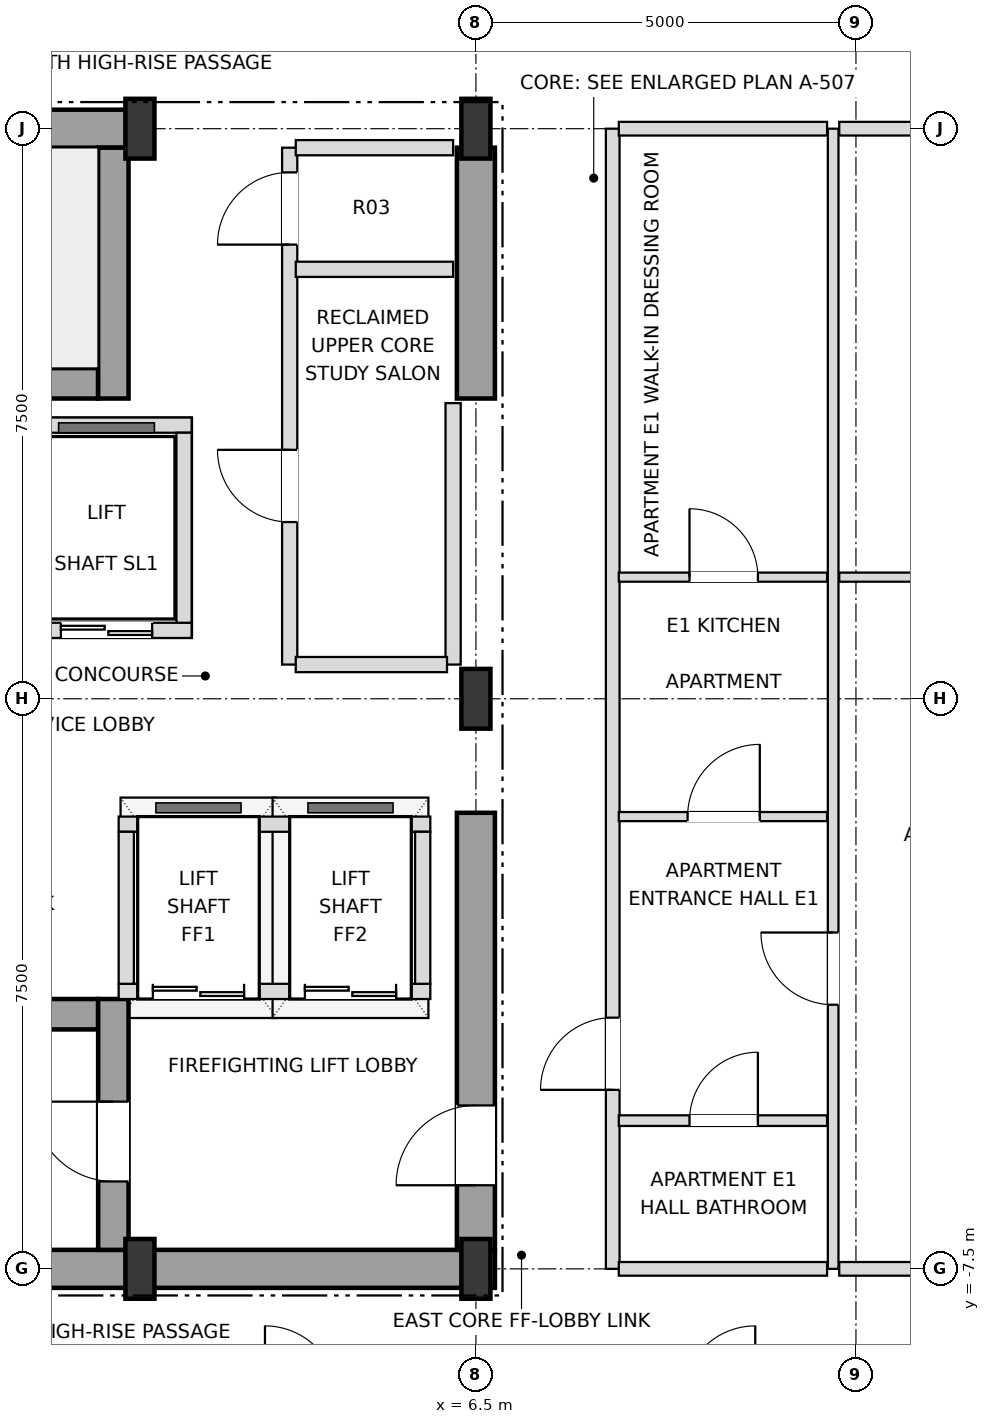
"""IFC4 building model, lengths in metres.
Left out: names, types, materials, properties, quantities, classifications, styles, units other than length and angle.
Written with IfcOpenShell. Run it as: python <this file> out.ifc"""

import sys

from ifc_helpers import new_model, si_unit, direction, frame, frame_2d, origin, origin_2d, place, context, subcontext, project, spatial, rectangle, i_section, extrude, element, fill, save


model = new_model("IFC4")
c1 = context("Model", 3, precision=1e-05, world=origin(), true_north=direction((0.0, 1.0)))
c2 = subcontext(c1, "Body", "Model", "MODEL_VIEW")
j1 = project(units=[si_unit("LENGTHUNIT", "METRE"), si_unit("PLANEANGLEUNIT", "RADIAN")], contexts=[c1])
p1 = place(None, origin())
s1 = spatial("IfcSite", under=j1, at=p1, CompositionType="ELEMENT")
p2 = place(p1, origin())
s2 = spatial("IfcBuilding", under=s1, at=p2, CompositionType="ELEMENT")
p3 = place(p2, frame((0.0, 0.0, 276.3)))
s3 = spatial("IfcBuildingStorey", under=s2, at=p3, CompositionType="ELEMENT", Elevation=276.3)
for number, where, z_axis, x_axis in (
    (1, (2.08, -7.5, 0.0), (0.0, 0.0, 1.0), (1.0, 0.0, 0.0)),
    (2, (6.5, -7.5, 0.0), (0.0, 0.0, 1.0), (1.0, 0.0, 0.0)),
    (3, (6.5, 0.0, 0.0), (0.0, 0.0, 1.0), (1.0, 0.0, 0.0)),
    (4, (2.08, 7.5, 0.0), (0.0, 0.0, 1.0), (1.0, 0.0, 0.0)),
    (5, (6.5, 7.5, 0.0), (0.0, 0.0, 1.0), (1.0, 0.0, 0.0)),
):
    element("IfcColumn", number, at=place(p3, frame(where, z_axis=z_axis, x_axis=x_axis)), inside=s3, PredefinedType="COLUMN", context=c2, shape_type="SweptSolid", body=[
        extrude(i_section(OverallWidth=0.382, OverallDepth=0.786, WebThickness=0.02, FlangeThickness=0.033, at=origin_2d()), origin(), (0.0, 0.0, 1.0), 3.6),
    ])
p4 = place(p3, frame((0.0, -7.5, 0.0), z_axis=(0.0, 0.0, 1.0), x_axis=(1.0, 0.0, 0.0)))
e6 = element("IfcWall", 6, at=p4, inside=s3, PredefinedType="SHEAR", context=c2, shape_type="SweptSolid", body=[
    extrude(rectangle(XDim=6.75, YDim=0.5, at=frame_2d((3.375, 0.0))), origin(), (0.0, 0.0, 1.0), 3.38),
])
p5 = place(p3, frame((0.0, 7.5, 0.0), z_axis=(0.0, 0.0, 1.0), x_axis=(1.0, 0.0, 0.0)))
e7 = element("IfcWall", 7, at=p5, inside=s3, PredefinedType="SHEAR", context=c2, shape_type="SweptSolid", body=[
    extrude(rectangle(XDim=2.08, YDim=0.5, at=frame_2d((1.04, 0.0))), origin(), (0.0, 0.0, 1.0), 3.38),
])
p6 = place(p3, frame((6.5, -7.25, 0.0), z_axis=(0.0, 0.0, 1.0), x_axis=(0.0, 1.0, 0.0)))
e8 = element("IfcWall", 8, at=p6, inside=s3, PredefinedType="SHEAR", context=c2, shape_type="SweptSolid", body=[
    extrude(rectangle(XDim=5.75, YDim=0.5, at=frame_2d((2.875, 0.0))), origin(), (0.0, 0.0, 1.0), 3.38),
])
p7 = place(p6, frame((0.85, 0.0, 0.0)))
e9 = element("IfcOpeningElement", 9, at=p7, cuts=e8, PredefinedType="OPENING", context=c2, shape_type="SweptSolid", body=[
    extrude(rectangle(XDim=1.05, YDim=2.15, at=frame_2d((0.525, 1.075))), frame((0.0, 0.26, 0.0), z_axis=(0.0, -1.0, 0.0), x_axis=(1.0, 0.0, 0.0)), (0.0, 0.0, 1.0), 0.52),
])
p8 = place(p3, frame((6.5, 3.95, 0.0), z_axis=(0.0, 0.0, 1.0), x_axis=(0.0, 1.0, 0.0)))
e10 = element("IfcWall", 10, at=p8, inside=s3, PredefinedType="SHEAR", context=c2, shape_type="SweptSolid", body=[
    extrude(rectangle(XDim=3.3, YDim=0.5, at=frame_2d((1.65, 0.0))), origin(), (0.0, 0.0, 1.0), 3.38),
])
p9 = place(p3, frame((-6.25, -4.15, 0.0), z_axis=(0.0, 0.0, 1.0), x_axis=(1.0, 0.0, 0.0)))
e11 = element("IfcWall", 11, at=p9, inside=s3, PredefinedType="SHEAR", context=c2, shape_type="SweptSolid", body=[
    extrude(rectangle(XDim=7.78, YDim=0.4, at=frame_2d((3.89, 0.0))), origin(), (0.0, 0.0, 1.0), 3.38),
])
p10 = place(p3, frame((1.73, -7.25, 0.0), z_axis=(0.0, 0.0, 1.0), x_axis=(0.0, 1.0, 0.0)))
e12 = element("IfcWall", 12, at=p10, inside=s3, PredefinedType="SHEAR", context=c2, shape_type="SweptSolid", body=[
    extrude(rectangle(XDim=3.3, YDim=0.4, at=frame_2d((1.65, 0.0))), origin(), (0.0, 0.0, 1.0), 3.38),
])
p11 = place(p10, frame((0.9, 0.0, 0.0)))
e13 = element("IfcOpeningElement", 13, at=p11, cuts=e12, PredefinedType="OPENING", context=c2, shape_type="SweptSolid", body=[
    extrude(rectangle(XDim=1.05, YDim=2.15, at=frame_2d((0.525, 1.075))), frame((0.0, 0.21, 0.0), z_axis=(0.0, -1.0, 0.0), x_axis=(1.0, 0.0, 0.0)), (0.0, 0.0, 1.0), 0.42),
])
p12 = place(p3, frame((-5.55, 4.15, 0.0), z_axis=(0.0, 0.0, 1.0), x_axis=(1.0, 0.0, 0.0)))
e14 = element("IfcWall", 14, at=p12, inside=s3, PredefinedType="SHEAR", context=c2, shape_type="SweptSolid", body=[
    extrude(rectangle(XDim=7.08, YDim=0.4, at=frame_2d((3.54, 0.0))), origin(), (0.0, 0.0, 1.0), 3.38),
])
p13 = place(p3, frame((1.73, 3.95, 0.0), z_axis=(0.0, 0.0, 1.0), x_axis=(0.0, 1.0, 0.0)))
e15 = element("IfcWall", 15, at=p13, inside=s3, PredefinedType="SHEAR", context=c2, shape_type="SweptSolid", body=[
    extrude(rectangle(XDim=3.3, YDim=0.4, at=frame_2d((1.65, 0.0))), origin(), (0.0, 0.0, 1.0), 3.38),
])
p14 = place(p3, frame((-2.82, 0.9, 0.0), z_axis=(0.0, 0.0, 1.0), x_axis=(1.0, 0.0, 0.0)))
e16 = element("IfcWall", 16, at=p14, inside=s3, PredefinedType="SOLIDWALL", context=c2, shape_type="SweptSolid", body=[
    extrude(rectangle(XDim=5.58, YDim=0.2, at=frame_2d((2.79, 0.0))), origin(), (0.0, 0.0, 1.0), 3.38),
])
p15 = place(p14, frame((0.49, 0.0, 0.0)))
e17 = element("IfcOpeningElement", 17, at=p15, cuts=e16, PredefinedType="OPENING", context=c2, shape_type="SweptSolid", body=[
    extrude(rectangle(XDim=1.1, YDim=2.15, at=frame_2d((0.55, 1.075))), frame((0.0, 0.11, 0.0), z_axis=(0.0, -1.0, 0.0), x_axis=(1.0, 0.0, 0.0)), (0.0, 0.0, 1.0), 0.22),
])
p16 = place(p14, frame((2.17, 0.0, 0.0)))
e18 = element("IfcOpeningElement", 18, at=p16, cuts=e16, PredefinedType="OPENING", context=c2, shape_type="SweptSolid", body=[
    extrude(rectangle(XDim=1.1, YDim=2.15, at=frame_2d((0.55, 1.075))), frame((0.0, 0.11, 0.0), z_axis=(0.0, -1.0, 0.0), x_axis=(1.0, 0.0, 0.0)), (0.0, 0.0, 1.0), 0.22),
])
p17 = place(p14, frame((3.86, 0.0, 0.0)))
e19 = element("IfcOpeningElement", 19, at=p17, cuts=e16, PredefinedType="OPENING", context=c2, shape_type="SweptSolid", body=[
    extrude(rectangle(XDim=1.2, YDim=2.2, at=frame_2d((0.6, 1.1))), frame((0.0, 0.11, 0.0), z_axis=(0.0, -1.0, 0.0), x_axis=(1.0, 0.0, 0.0)), (0.0, 0.0, 1.0), 0.22),
])
p18 = place(p3, frame((-2.82, 3.6, 0.0), z_axis=(0.0, 0.0, 1.0), x_axis=(1.0, 0.0, 0.0)))
e20 = element("IfcWall", 20, at=p18, inside=s3, PredefinedType="SOLIDWALL", context=c2, shape_type="SweptSolid", body=[
    extrude(rectangle(XDim=5.58, YDim=0.2, at=frame_2d((2.79, 0.0))), origin(), (0.0, 0.0, 1.0), 3.38),
])
p19 = place(p3, frame((2.66, 1.0, 0.0), z_axis=(0.0, 0.0, 1.0), x_axis=(0.0, 1.0, 0.0)))
e21 = element("IfcWall", 21, at=p19, inside=s3, PredefinedType="SOLIDWALL", context=c2, shape_type="SweptSolid", body=[
    extrude(rectangle(XDim=2.5, YDim=0.2, at=frame_2d((1.25, 0.0))), origin(), (0.0, 0.0, 1.0), 3.38),
])
p20 = place(p3, frame((1.8, -3.85, 0.0), z_axis=(0.0, 0.0, 1.0), x_axis=(1.0, 0.0, 0.0)))
e22 = element("IfcWall", 22, at=p20, inside=s3, PredefinedType="SOLIDWALL", context=c2, shape_type="SweptSolid", body=[
    extrude(rectangle(XDim=4.1, YDim=0.2, at=frame_2d((2.05, 0.0))), origin(), (0.0, 0.0, 1.0), 3.38),
])
p21 = place(p20, frame((0.45, 0.0, 0.0)))
e23 = element("IfcOpeningElement", 23, at=p21, cuts=e22, PredefinedType="OPENING", context=c2, shape_type="SweptSolid", body=[
    extrude(rectangle(XDim=1.2, YDim=2.2, at=frame_2d((0.6, 1.1))), frame((0.0, 0.11, 0.0), z_axis=(0.0, -1.0, 0.0), x_axis=(1.0, 0.0, 0.0)), (0.0, 0.0, 1.0), 0.22),
])
p22 = place(p20, frame((2.45, 0.0, 0.0)))
e24 = element("IfcOpeningElement", 24, at=p22, cuts=e22, PredefinedType="OPENING", context=c2, shape_type="SweptSolid", body=[
    extrude(rectangle(XDim=1.2, YDim=2.2, at=frame_2d((0.6, 1.1))), frame((0.0, 0.11, 0.0), z_axis=(0.0, -1.0, 0.0), x_axis=(1.0, 0.0, 0.0)), (0.0, 0.0, 1.0), 0.22),
])
p23 = place(p3, frame((1.8, -1.65, 0.0), z_axis=(0.0, 0.0, 1.0), x_axis=(1.0, 0.0, 0.0)))
e25 = element("IfcWall", 25, at=p23, inside=s3, PredefinedType="SOLIDWALL", context=c2, shape_type="SweptSolid", body=[
    extrude(rectangle(XDim=4.1, YDim=0.2, at=frame_2d((2.05, 0.0))), origin(), (0.0, 0.0, 1.0), 3.38),
])
for number, where, z_axis, x_axis in (
    (26, (1.9, -3.75, 0.0), (0.0, 0.0, 1.0), (0.0, 1.0, 0.0)),
    (27, (5.8, -3.75, 0.0), (0.0, 0.0, 1.0), (0.0, 1.0, 0.0)),
):
    element("IfcWall", number, at=place(p3, frame(where, z_axis=z_axis, x_axis=x_axis)), inside=s3, PredefinedType="SOLIDWALL", context=c2, shape_type="SweptSolid", body=[
        extrude(rectangle(XDim=2.0, YDim=0.2, at=frame_2d((1.0, 0.0))), origin(), (0.0, 0.0, 1.0), 3.38),
    ])
p24 = place(p3, frame((4.05, 0.45, 0.0), z_axis=(0.0, 0.0, 1.0), x_axis=(0.0, 1.0, 0.0)))
e28 = element("IfcWall", 28, at=p24, inside=s3, PredefinedType="SOLIDWALL", context=c2, shape_type="SweptSolid", body=[
    extrude(rectangle(XDim=6.8, YDim=0.2, at=frame_2d((3.4, 0.0))), origin(), (0.0, 0.0, 1.0), 3.38),
])
p25 = place(p24, frame((1.875, 0.0, 0.0)))
e29 = element("IfcOpeningElement", 29, at=p25, cuts=e28, PredefinedType="OPENING", context=c2, shape_type="SweptSolid", body=[
    extrude(rectangle(XDim=0.95, YDim=2.15, at=frame_2d((0.475, 1.075))), frame((0.0, 0.11, 0.0), z_axis=(0.0, -1.0, 0.0), x_axis=(1.0, 0.0, 0.0)), (0.0, 0.0, 1.0), 0.22),
])
p26 = place(p24, frame((5.525, 0.0, 0.0)))
e30 = element("IfcOpeningElement", 30, at=p26, cuts=e28, PredefinedType="OPENING", context=c2, shape_type="SweptSolid", body=[
    extrude(rectangle(XDim=0.95, YDim=2.15, at=frame_2d((0.475, 1.075))), frame((0.0, 0.11, 0.0), z_axis=(0.0, -1.0, 0.0), x_axis=(1.0, 0.0, 0.0)), (0.0, 0.0, 1.0), 0.22),
])
p27 = place(p3, frame((6.2, 0.45, 0.0), z_axis=(0.0, 0.0, 1.0), x_axis=(0.0, 1.0, 0.0)))
e31 = element("IfcWall", 31, at=p27, inside=s3, PredefinedType="SOLIDWALL", context=c2, shape_type="SweptSolid", body=[
    extrude(rectangle(XDim=3.44, YDim=0.2, at=frame_2d((1.72, 0.0))), origin(), (0.0, 0.0, 1.0), 3.38),
])
p28 = place(p3, frame((8.3, -7.5, 0.0), z_axis=(0.0, 0.0, 1.0), x_axis=(0.0, 1.0, 0.0)))
e32 = element("IfcWall", 32, at=p28, inside=s3, PredefinedType="PARTITIONING", context=c2, shape_type="SweptSolid", body=[
    extrude(rectangle(XDim=15.0, YDim=0.18, at=frame_2d((7.5, 0.0))), origin(), (0.0, 0.0, 1.0), 3.38),
])
p29 = place(p28, frame((2.355, 0.0, 0.0)))
e33 = element("IfcOpeningElement", 33, at=p29, cuts=e32, PredefinedType="OPENING", context=c2, shape_type="SweptSolid", body=[
    extrude(rectangle(XDim=0.95, YDim=2.15, at=frame_2d((0.475, 1.075))), frame((0.0, 0.1, 0.0), z_axis=(0.0, -1.0, 0.0), x_axis=(1.0, 0.0, 0.0)), (0.0, 0.0, 1.0), 0.2),
])
p30 = place(p3, frame((11.2, -7.5, 0.0), z_axis=(0.0, 0.0, 1.0), x_axis=(0.0, 1.0, 0.0)))
e34 = element("IfcWall", 34, at=p30, inside=s3, PredefinedType="PARTITIONING", context=c2, shape_type="SweptSolid", body=[
    extrude(rectangle(XDim=15.0, YDim=0.14, at=frame_2d((7.5, 0.0))), origin(), (0.0, 0.0, 1.0), 3.38),
])
p31 = place(p30, frame((3.475, 0.0, 0.0)))
e35 = element("IfcOpeningElement", 35, at=p31, cuts=e34, PredefinedType="OPENING", context=c2, shape_type="SweptSolid", body=[
    extrude(rectangle(XDim=0.95, YDim=2.1, at=frame_2d((0.475, 1.05))), frame((0.0, 0.08, 0.0), z_axis=(0.0, -1.0, 0.0), x_axis=(1.0, 0.0, 0.0)), (0.0, 0.0, 1.0), 0.16),
])
p32 = place(p3, frame((8.38, -7.5, 0.0), z_axis=(0.0, 0.0, 1.0), x_axis=(1.0, 0.0, 0.0)))
e36 = element("IfcWall", 36, at=p32, inside=s3, PredefinedType="PARTITIONING", context=c2, shape_type="SweptSolid", body=[
    extrude(rectangle(XDim=2.74, YDim=0.18, at=frame_2d((1.37, 0.0))), origin(), (0.0, 0.0, 1.0), 2.826),
])
p33 = place(p3, frame((11.28, -7.5, 0.0), z_axis=(0.0, 0.0, 1.0), x_axis=(1.0, 0.0, 0.0)))
e37 = element("IfcWall", 37, at=p33, inside=s3, PredefinedType="PARTITIONING", context=c2, shape_type="SweptSolid", body=[
    extrude(rectangle(XDim=5.62, YDim=0.18, at=frame_2d((2.81, 0.0))), origin(), (0.0, 0.0, 1.0), 2.826),
])
p34 = place(p3, frame((8.38, -5.55, 0.0), z_axis=(0.0, 0.0, 1.0), x_axis=(1.0, 0.0, 0.0)))
e38 = element("IfcWall", 38, at=p34, inside=s3, PredefinedType="PARTITIONING", context=c2, shape_type="SweptSolid", body=[
    extrude(rectangle(XDim=2.74, YDim=0.14, at=frame_2d((1.37, 0.0))), origin(), (0.0, 0.0, 1.0), 3.38),
])
p35 = place(p34, frame((0.93, 0.0, 0.0)))
e39 = element("IfcOpeningElement", 39, at=p35, cuts=e38, PredefinedType="OPENING", context=c2, shape_type="SweptSolid", body=[
    extrude(rectangle(XDim=0.9, YDim=2.1, at=frame_2d((0.45, 1.05))), frame((0.0, 0.08, 0.0), z_axis=(0.0, -1.0, 0.0), x_axis=(1.0, 0.0, 0.0)), (0.0, 0.0, 1.0), 0.16),
])
p36 = place(p3, frame((8.38, -1.55, 0.0), z_axis=(0.0, 0.0, 1.0), x_axis=(1.0, 0.0, 0.0)))
e40 = element("IfcWall", 40, at=p36, inside=s3, PredefinedType="PARTITIONING", context=c2, shape_type="SweptSolid", body=[
    extrude(rectangle(XDim=2.74, YDim=0.12, at=frame_2d((1.37, 0.0))), origin(), (0.0, 0.0, 1.0), 3.38),
])
p37 = place(p36, frame((0.905, 0.0, 0.0)))
e41 = element("IfcOpeningElement", 41, at=p37, cuts=e40, PredefinedType="OPENING", context=c2, shape_type="SweptSolid", body=[
    extrude(rectangle(XDim=0.95, YDim=2.1, at=frame_2d((0.475, 1.05))), frame((0.0, 0.07, 0.0), z_axis=(0.0, -1.0, 0.0), x_axis=(1.0, 0.0, 0.0)), (0.0, 0.0, 1.0), 0.14),
])
p38 = place(p3, frame((4.13, 0.45, 0.0), z_axis=(0.0, 0.0, 1.0), x_axis=(1.0, 0.0, 0.0)))
e42 = element("IfcWall", 42, at=p38, inside=s3, PredefinedType="SOLIDWALL", context=c2, shape_type="SweptSolid", body=[
    extrude(rectangle(XDim=1.99, YDim=0.2, at=frame_2d((0.995, 0.0))), origin(), (0.0, 0.0, 1.0), 3.38),
])
p39 = place(p3, frame((8.38, 1.6, 0.0), z_axis=(0.0, 0.0, 1.0), x_axis=(1.0, 0.0, 0.0)))
e43 = element("IfcWall", 43, at=p39, inside=s3, PredefinedType="PARTITIONING", context=c2, shape_type="SweptSolid", body=[
    extrude(rectangle(XDim=2.74, YDim=0.12, at=frame_2d((1.37, 0.0))), origin(), (0.0, 0.0, 1.0), 3.38),
])
p40 = place(p39, frame((0.93, 0.0, 0.0)))
e44 = element("IfcOpeningElement", 44, at=p40, cuts=e43, PredefinedType="OPENING", context=c2, shape_type="SweptSolid", body=[
    extrude(rectangle(XDim=0.9, YDim=2.1, at=frame_2d((0.45, 1.05))), frame((0.0, 0.07, 0.0), z_axis=(0.0, -1.0, 0.0), x_axis=(1.0, 0.0, 0.0)), (0.0, 0.0, 1.0), 0.14),
])
p41 = place(p3, frame((11.28, 1.6, 0.0), z_axis=(0.0, 0.0, 1.0), x_axis=(1.0, 0.0, 0.0)))
e45 = element("IfcWall", 45, at=p41, inside=s3, PredefinedType="PARTITIONING", context=c2, shape_type="SweptSolid", body=[
    extrude(rectangle(XDim=5.54, YDim=0.12, at=frame_2d((2.77, 0.0))), origin(), (0.0, 0.0, 1.0), 3.018),
])
p42 = place(p41, frame((2.33, 0.0, 0.0)))
e46 = element("IfcOpeningElement", 46, at=p42, cuts=e45, PredefinedType="OPENING", context=c2, shape_type="SweptSolid", body=[
    extrude(rectangle(XDim=0.9, YDim=2.1, at=frame_2d((0.45, 1.05))), frame((0.0, 0.07, 0.0), z_axis=(0.0, -1.0, 0.0), x_axis=(1.0, 0.0, 0.0)), (0.0, 0.0, 1.0), 0.14),
])
for number, where, z_axis, x_axis in (
    (47, (4.13, 5.65, 0.0), (0.0, 0.0, 1.0), (1.0, 0.0, 0.0)),
    (48, (4.13, 7.25, 0.0), (0.0, 0.0, 1.0), (1.0, 0.0, 0.0)),
):
    element("IfcWall", number, at=place(p3, frame(where, z_axis=z_axis, x_axis=x_axis)), inside=s3, PredefinedType="SOLIDWALL", context=c2, shape_type="SweptSolid", body=[
        extrude(rectangle(XDim=2.07, YDim=0.2, at=frame_2d((1.035, 0.0))), origin(), (0.0, 0.0, 1.0), 3.38),
    ])
p43 = place(p3, frame((8.38, 7.5, 0.0), z_axis=(0.0, 0.0, 1.0), x_axis=(1.0, 0.0, 0.0)))
e49 = element("IfcWall", 49, at=p43, inside=s3, PredefinedType="PARTITIONING", context=c2, shape_type="SweptSolid", body=[
    extrude(rectangle(XDim=2.74, YDim=0.18, at=frame_2d((1.37, 0.0))), origin(), (0.0, 0.0, 1.0), 2.826),
])
p44 = place(p3, frame((11.28, 7.5, 0.0), z_axis=(0.0, 0.0, 1.0), x_axis=(1.0, 0.0, 0.0)))
e50 = element("IfcWall", 50, at=p44, inside=s3, PredefinedType="PARTITIONING", context=c2, shape_type="SweptSolid", body=[
    extrude(rectangle(XDim=5.62, YDim=0.18, at=frame_2d((2.81, 0.0))), origin(), (0.0, 0.0, 1.0), 2.826),
])
p45 = place(p7, origin())
e51 = element("IfcDoor", 51, at=p45, inside=s3, OperationType="SINGLE_SWING_LEFT", PredefinedType="DOOR", context=c2, shape_type="SweptSolid", body=[
    extrude(rectangle(XDim=1.05, YDim=2.15, at=frame_2d((0.525, 1.075))), frame((0.0, 0.025, 0.0), z_axis=(0.0, -1.0, 0.0), x_axis=(1.0, 0.0, 0.0)), (0.0, 0.0, 1.0), 0.05),
])
fill(e9, e51)
p46 = place(p11, origin())
e52 = element("IfcDoor", 52, at=p46, inside=s3, OperationType="SINGLE_SWING_RIGHT", PredefinedType="DOOR", context=c2, shape_type="SweptSolid", body=[
    extrude(rectangle(XDim=1.05, YDim=2.15, at=frame_2d((0.525, 1.075))), frame((0.0, 0.025, 0.0), z_axis=(0.0, -1.0, 0.0), x_axis=(1.0, 0.0, 0.0)), (0.0, 0.0, 1.0), 0.05),
])
fill(e13, e52)
p47 = place(p17, origin())
e53 = element("IfcDoor", 53, at=p47, inside=s3, OperationType="DOUBLE_DOOR_SLIDING", PredefinedType="DOOR", context=c2, shape_type="SweptSolid", body=[
    extrude(rectangle(XDim=1.2, YDim=2.2, at=frame_2d((0.6, 1.1))), frame((0.0, 0.025, 0.0), z_axis=(0.0, -1.0, 0.0), x_axis=(1.0, 0.0, 0.0)), (0.0, 0.0, 1.0), 0.05),
])
fill(e19, e53)
p48 = place(p21, origin())
e54 = element("IfcDoor", 54, at=p48, inside=s3, OperationType="DOUBLE_DOOR_SLIDING", PredefinedType="DOOR", context=c2, shape_type="SweptSolid", body=[
    extrude(rectangle(XDim=1.2, YDim=2.2, at=frame_2d((0.6, 1.1))), frame((0.0, 0.025, 0.0), z_axis=(0.0, -1.0, 0.0), x_axis=(1.0, 0.0, 0.0)), (0.0, 0.0, 1.0), 0.05),
])
fill(e23, e54)
p49 = place(p22, origin())
e55 = element("IfcDoor", 55, at=p49, inside=s3, OperationType="DOUBLE_DOOR_SLIDING", PredefinedType="DOOR", context=c2, shape_type="SweptSolid", body=[
    extrude(rectangle(XDim=1.2, YDim=2.2, at=frame_2d((0.6, 1.1))), frame((0.0, 0.025, 0.0), z_axis=(0.0, -1.0, 0.0), x_axis=(1.0, 0.0, 0.0)), (0.0, 0.0, 1.0), 0.05),
])
fill(e24, e55)
p50 = place(p25, origin())
e56 = element("IfcDoor", 56, at=p50, inside=s3, OperationType="SINGLE_SWING_RIGHT", PredefinedType="DOOR", context=c2, shape_type="SweptSolid", body=[
    extrude(rectangle(XDim=0.95, YDim=2.15, at=frame_2d((0.475, 1.075))), frame((0.0, 0.025, 0.0), z_axis=(0.0, -1.0, 0.0), x_axis=(1.0, 0.0, 0.0)), (0.0, 0.0, 1.0), 0.05),
])
fill(e29, e56)
p51 = place(p26, origin())
e57 = element("IfcDoor", 57, at=p51, inside=s3, OperationType="SINGLE_SWING_LEFT", PredefinedType="DOOR", context=c2, shape_type="SweptSolid", body=[
    extrude(rectangle(XDim=0.95, YDim=2.15, at=frame_2d((0.475, 1.075))), frame((0.0, 0.025, 0.0), z_axis=(0.0, -1.0, 0.0), x_axis=(1.0, 0.0, 0.0)), (0.0, 0.0, 1.0), 0.05),
])
fill(e30, e57)
p52 = place(p35, origin())
e58 = element("IfcDoor", 58, at=p52, inside=s3, OperationType="SINGLE_SWING_RIGHT", PredefinedType="DOOR", context=c2, shape_type="SweptSolid", body=[
    extrude(rectangle(XDim=0.9, YDim=2.1, at=frame_2d((0.45, 1.05))), frame((0.0, 0.025, 0.0), z_axis=(0.0, -1.0, 0.0), x_axis=(1.0, 0.0, 0.0)), (0.0, 0.0, 1.0), 0.05),
])
fill(e39, e58)
p53 = place(p29, origin())
e59 = element("IfcDoor", 59, at=p53, inside=s3, OperationType="SINGLE_SWING_LEFT", PredefinedType="DOOR", context=c2, shape_type="SweptSolid", body=[
    extrude(rectangle(XDim=0.95, YDim=2.15, at=frame_2d((0.475, 1.075))), frame((0.0, 0.025, 0.0), z_axis=(0.0, -1.0, 0.0), x_axis=(1.0, 0.0, 0.0)), (0.0, 0.0, 1.0), 0.05),
])
fill(e33, e59)
p54 = place(p37, origin())
e60 = element("IfcDoor", 60, at=p54, inside=s3, OperationType="SINGLE_SWING_RIGHT", PredefinedType="DOOR", context=c2, shape_type="SweptSolid", body=[
    extrude(rectangle(XDim=0.95, YDim=2.1, at=frame_2d((0.475, 1.05))), frame((0.0, 0.025, 0.0), z_axis=(0.0, -1.0, 0.0), x_axis=(1.0, 0.0, 0.0)), (0.0, 0.0, 1.0), 0.05),
])
fill(e41, e60)
p55 = place(p40, origin())
e61 = element("IfcDoor", 61, at=p55, inside=s3, OperationType="SINGLE_SWING_LEFT", PredefinedType="DOOR", context=c2, shape_type="SweptSolid", body=[
    extrude(rectangle(XDim=0.9, YDim=2.1, at=frame_2d((0.45, 1.05))), frame((0.0, 0.025, 0.0), z_axis=(0.0, -1.0, 0.0), x_axis=(1.0, 0.0, 0.0)), (0.0, 0.0, 1.0), 0.05),
])
fill(e44, e61)
p56 = place(p31, origin())
e62 = element("IfcDoor", 62, at=p56, inside=s3, OperationType="SINGLE_SWING_RIGHT", PredefinedType="DOOR", context=c2, shape_type="SweptSolid", body=[
    extrude(rectangle(XDim=0.95, YDim=2.1, at=frame_2d((0.475, 1.05))), frame((0.0, 0.025, 0.0), z_axis=(0.0, -1.0, 0.0), x_axis=(1.0, 0.0, 0.0)), (0.0, 0.0, 1.0), 0.05),
])
fill(e35, e62)
save(model, sys.argv[1])
